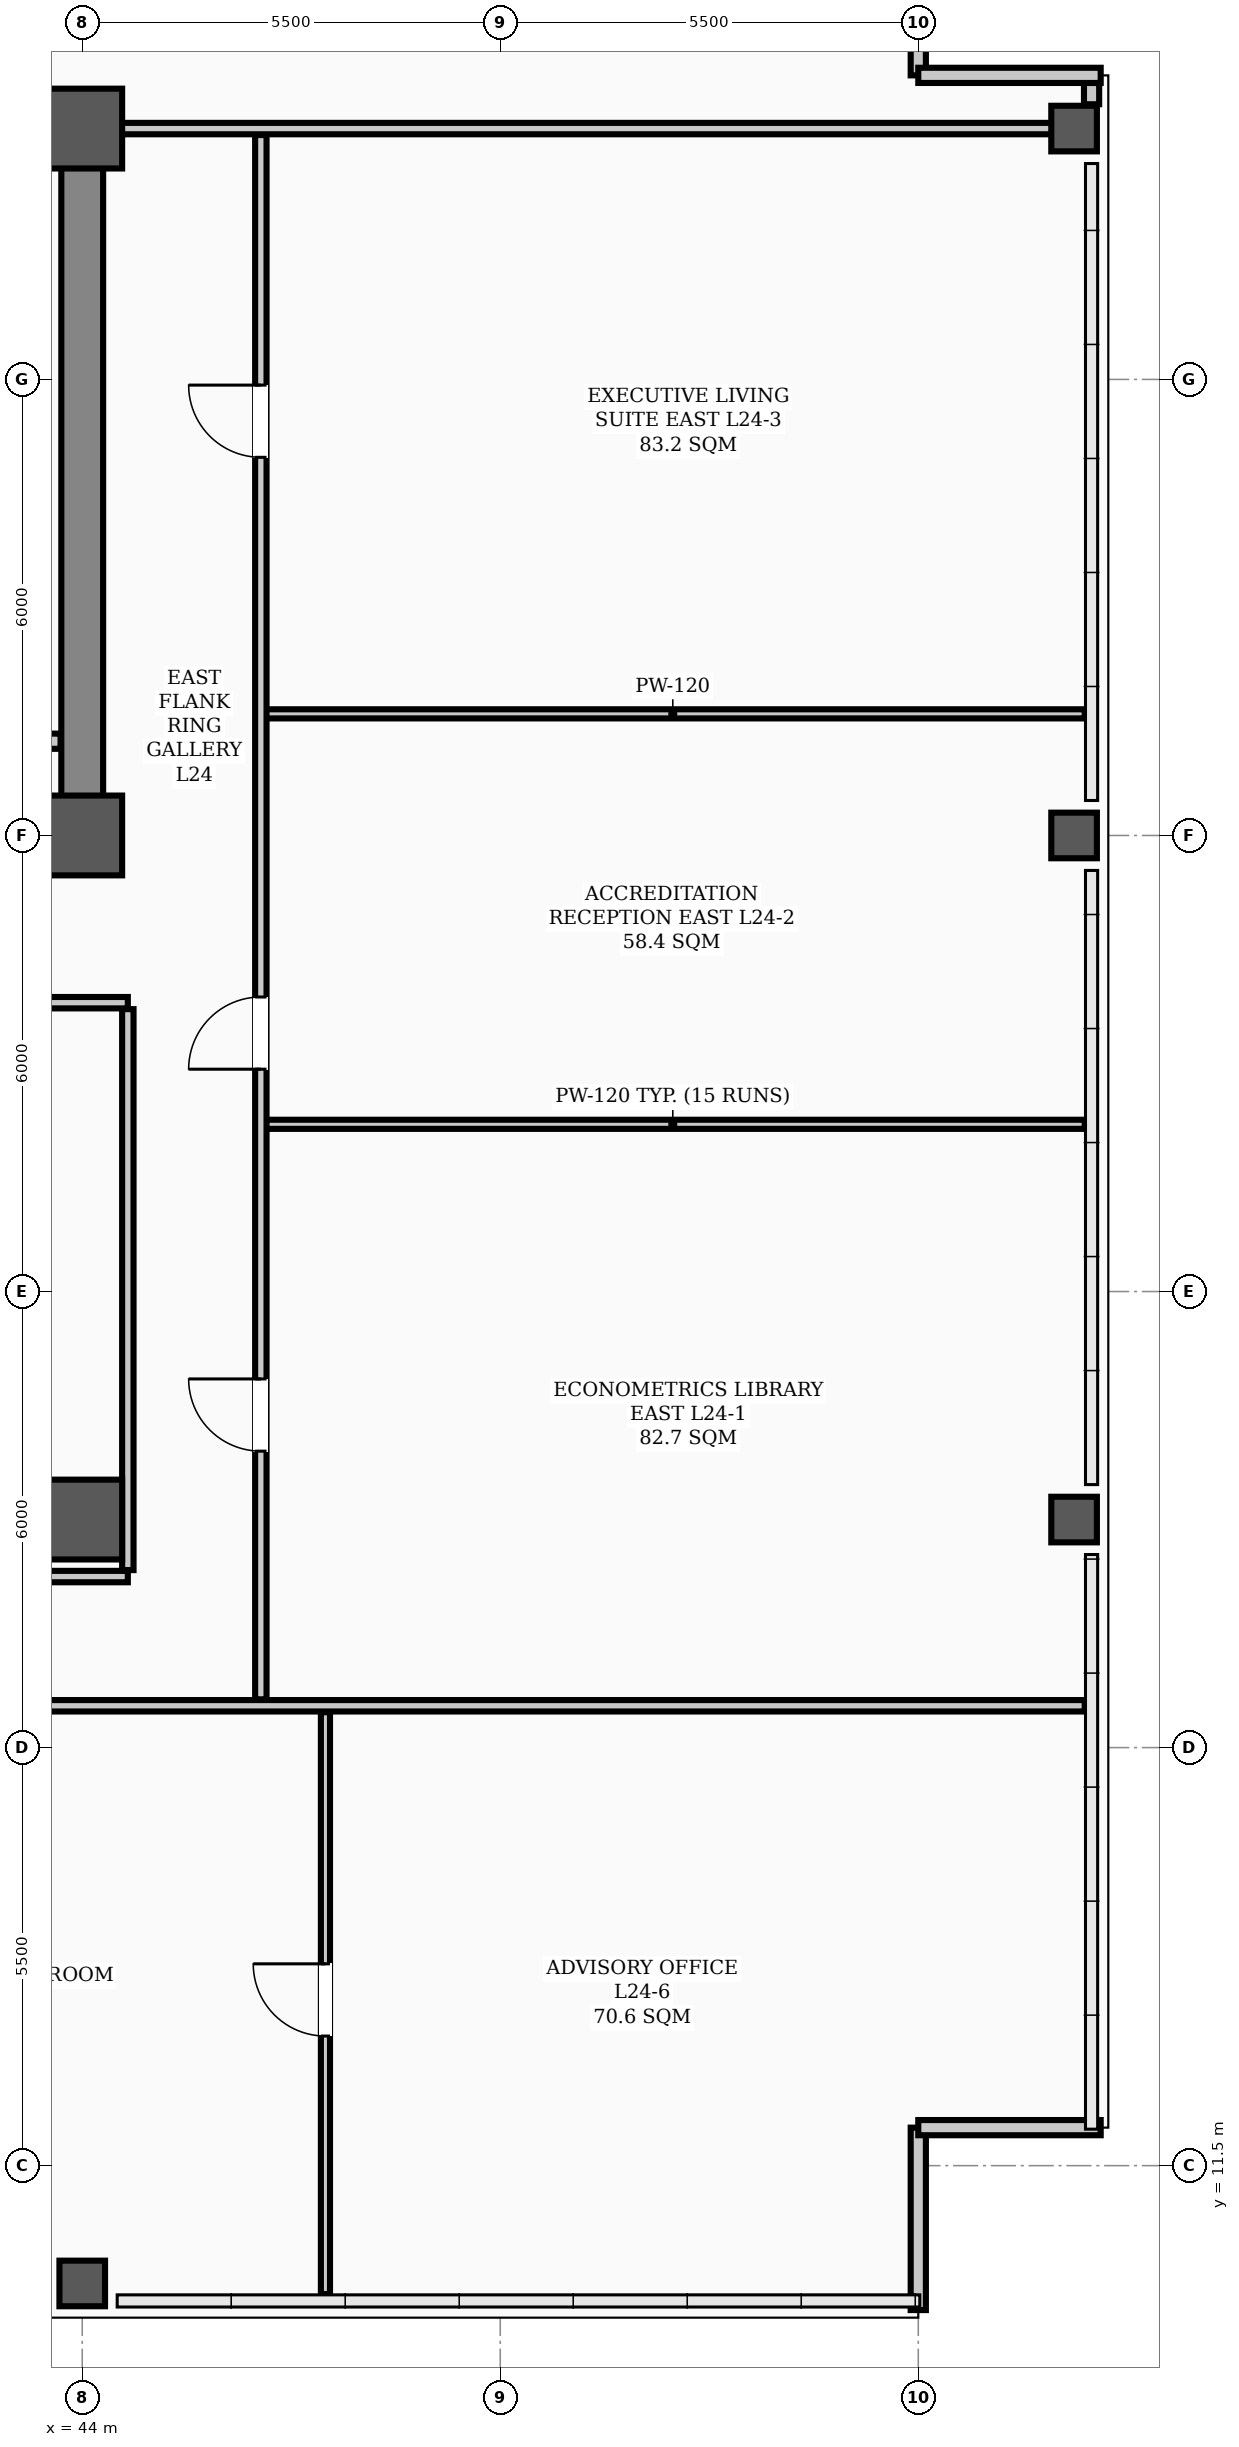
"""IFC4 building model, lengths in metres.
Left out: names, types, materials, properties, quantities, classifications, styles, units other than length and angle.
Written with IfcOpenShell. Run it as: python <this file> out.ifc"""

import sys

from ifc_helpers import new_model, si_unit, direction, frame, frame_2d, origin, origin_2d, place, context, subcontext, project, spatial, rectangle, hollow_rectangle, extrude, element, fill, save


model = new_model("IFC4")
c1 = context("Model", 3, precision=1e-05, world=origin(), true_north=direction((0.0, 1.0)))
c2 = subcontext(c1, "Body", "Model", "MODEL_VIEW")
j1 = project(units=[si_unit("LENGTHUNIT", "METRE"), si_unit("PLANEANGLEUNIT", "RADIAN")], contexts=[c1])
p1 = place(None, origin())
s1 = spatial("IfcSite", under=j1, at=p1, CompositionType="ELEMENT")
p2 = place(p1, origin())
s2 = spatial("IfcBuilding", under=s1, at=p2, CompositionType="ELEMENT")
p3 = place(p2, frame((0.0, 0.0, 96.7)))
s3 = spatial("IfcBuildingStorey", under=s2, at=p3, CompositionType="ELEMENT", Elevation=96.7)
for number, where, z_axis, x_axis in (
    (1, (44.0, 29.0, 0.0), (0.0, 0.0, 1.0), (1.0, 0.0, 0.0)),
    (2, (44.0, 38.3, 0.0), (0.0, 0.0, 1.0), (1.0, 0.0, 0.0)),
    (3, (44.0, 20.0, 0.0), (0.0, 0.0, 1.0), (1.0, 0.0, 0.0)),
):
    element("IfcColumn", number, at=place(p3, frame(where, z_axis=z_axis, x_axis=x_axis)), inside=s3, PredefinedType="COLUMN", context=c2, shape_type="SweptSolid", body=[
        extrude(hollow_rectangle(XDim=1.05, YDim=1.05, WallThickness=0.038, InnerFilletRadius=0.019, OuterFilletRadius=0.057, at=origin_2d()), origin(), (0.0, 0.0, 1.0), 3.9),
    ])
for number, where, z_axis, x_axis in (
    (4, (44.0, 9.95, 0.0), (0.0, 0.0, 1.0), (1.0, 0.0, 0.0)),
    (5, (57.05, 20.0, 0.0), (0.0, 0.0, 1.0), (1.0, 0.0, 0.0)),
    (6, (57.05, 29.0, 0.0), (0.0, 0.0, 1.0), (1.0, 0.0, 0.0)),
    (7, (57.05, 38.3, 0.0), (0.0, 0.0, 1.0), (1.0, 0.0, 0.0)),
):
    element("IfcColumn", number, at=place(p3, frame(where, z_axis=z_axis, x_axis=x_axis)), inside=s3, PredefinedType="COLUMN", context=c2, shape_type="SweptSolid", body=[
        extrude(hollow_rectangle(XDim=0.6, YDim=0.6, WallThickness=0.026, InnerFilletRadius=0.013, OuterFilletRadius=0.039, at=origin_2d()), origin(), (0.0, 0.0, 1.0), 3.9),
    ])
p4 = place(p3, frame((57.28, 38.62, 0.0), z_axis=(0.0, 0.0, 1.0), x_axis=(0.0, 1.0, 0.0)))
e8 = element("IfcWall", 8, at=p4, inside=s3, PredefinedType="PARAPET", context=c2, shape_type="SweptSolid", body=[
    extrude(rectangle(XDim=0.28, YDim=0.2, at=frame_2d((0.14, 0.0))), origin(), (0.0, 0.0, 1.0), 1.2),
])
for number, where, z_axis, x_axis in (
    (9, (55.0, 9.6, 0.0), (0.0, 0.0, 1.0), (0.0, 1.0, 0.0)),
    (10, (55.0, 12.0, 0.0), (0.0, 0.0, 1.0), (1.0, 0.0, 0.0)),
    (11, (55.0, 41.4, 0.0), (0.0, 0.0, 1.0), (0.0, -1.0, 0.0)),
    (12, (55.0, 39.0, 0.0), (0.0, 0.0, 1.0), (1.0, 0.0, 0.0)),
):
    element("IfcWall", number, at=place(p3, frame(where, z_axis=z_axis, x_axis=x_axis)), inside=s3, PredefinedType="PARAPET", context=c2, shape_type="SweptSolid", body=[
        extrude(rectangle(XDim=2.4, YDim=0.2, at=frame_2d((1.2, 0.0))), origin(), (0.0, 0.0, 1.0), 1.2),
    ])
p5 = place(p3, frame((13.5, 29.0, 0.0), z_axis=(0.0, 0.0, 1.0), x_axis=(1.0, 0.0, 0.0)))
e13 = element("IfcWall", 13, at=p5, inside=s3, PredefinedType="SHEAR", context=c2, shape_type="SweptSolid", body=[
    extrude(rectangle(XDim=30.5, YDim=0.55, at=frame_2d((15.25, 0.0))), origin(), (0.0, 0.0, 1.0), 3.6),
])
p6 = place(p5, frame((1.75, 0.0, 0.0)))
e14 = element("IfcOpeningElement", 14, at=p6, cuts=e13, PredefinedType="OPENING", context=c2, shape_type="SweptSolid", body=[
    extrude(rectangle(XDim=1.1, YDim=2.08, at=frame_2d((0.55, 1.04))), frame((0.0, 0.285, 0.0), z_axis=(0.0, -1.0, 0.0), x_axis=(1.0, 0.0, 0.0)), (0.0, 0.0, 1.0), 0.57),
])
p7 = place(p5, frame((26.7, 0.0, 0.0)))
e15 = element("IfcOpeningElement", 15, at=p7, cuts=e13, PredefinedType="OPENING", context=c2, shape_type="SweptSolid", body=[
    extrude(rectangle(XDim=1.1, YDim=2.08, at=frame_2d((0.55, 1.04))), frame((0.0, 0.285, 0.0), z_axis=(0.0, -1.0, 0.0), x_axis=(1.0, 0.0, 0.0)), (0.0, 0.0, 1.0), 0.57),
])
p8 = place(p5, frame((6.8, 0.0, 0.0)))
e16 = element("IfcOpeningElement", 16, at=p8, cuts=e13, PredefinedType="OPENING", context=c2, shape_type="SweptSolid", body=[
    extrude(rectangle(XDim=1.1, YDim=2.08, at=frame_2d((0.55, 1.04))), frame((0.0, 0.285, 0.0), z_axis=(0.0, -1.0, 0.0), x_axis=(1.0, 0.0, 0.0)), (0.0, 0.0, 1.0), 0.57),
])
p9 = place(p5, frame((13.2, 0.0, 0.0)))
e17 = element("IfcOpeningElement", 17, at=p9, cuts=e13, PredefinedType="OPENING", context=c2, shape_type="SweptSolid", body=[
    extrude(rectangle(XDim=1.6, YDim=2.08, at=frame_2d((0.8, 1.04))), frame((0.0, 0.285, 0.0), z_axis=(0.0, -1.0, 0.0), x_axis=(1.0, 0.0, 0.0)), (0.0, 0.0, 1.0), 0.57),
])
p10 = place(p5, frame((19.53, 0.0, 0.0)))
e18 = element("IfcOpeningElement", 18, at=p10, cuts=e13, PredefinedType="OPENING", context=c2, shape_type="SweptSolid", body=[
    extrude(rectangle(XDim=0.9, YDim=2.08, at=frame_2d((0.45, 1.04))), frame((0.0, 0.285, 0.0), z_axis=(0.0, -1.0, 0.0), x_axis=(1.0, 0.0, 0.0)), (0.0, 0.0, 1.0), 0.57),
])
p11 = place(p5, frame((21.57, 0.0, 0.0)))
e19 = element("IfcOpeningElement", 19, at=p11, cuts=e13, PredefinedType="OPENING", context=c2, shape_type="SweptSolid", body=[
    extrude(rectangle(XDim=0.9, YDim=2.08, at=frame_2d((0.45, 1.04))), frame((0.0, 0.285, 0.0), z_axis=(0.0, -1.0, 0.0), x_axis=(1.0, 0.0, 0.0)), (0.0, 0.0, 1.0), 0.57),
])
p12 = place(p3, frame((13.5, 38.3, 0.0), z_axis=(0.0, 0.0, 1.0), x_axis=(1.0, 0.0, 0.0)))
e20 = element("IfcWall", 20, at=p12, inside=s3, PredefinedType="SHEAR", context=c2, shape_type="SweptSolid", body=[
    extrude(rectangle(XDim=30.5, YDim=0.55, at=frame_2d((15.25, 0.0))), origin(), (0.0, 0.0, 1.0), 3.6),
])
p13 = place(p3, frame((44.0, 29.35, 0.0), z_axis=(0.0, 0.0, 1.0), x_axis=(0.0, 1.0, 0.0)))
e21 = element("IfcWall", 21, at=p13, inside=s3, PredefinedType="SHEAR", context=c2, shape_type="SweptSolid", body=[
    extrude(rectangle(XDim=8.6, YDim=0.55, at=frame_2d((4.3, 0.0))), origin(), (0.0, 0.0, 1.0), 3.6),
])
p14 = place(p3, frame((42.4, 30.24, 0.0), z_axis=(0.0, 0.0, 1.0), x_axis=(1.0, 0.0, 0.0)))
e22 = element("IfcWall", 22, at=p14, inside=s3, PredefinedType="STANDARD", context=c2, shape_type="SweptSolid", body=[
    extrude(rectangle(XDim=1.315, YDim=0.2, at=frame_2d((0.658, 0.0))), origin(), (0.0, 0.0, 1.0), 2.18),
])
p15 = place(p3, frame((12.9, 26.8, 0.0), z_axis=(0.0, 0.0, 1.0), x_axis=(1.0, 0.0, 0.0)))
e23 = element("IfcWall", 23, at=p15, inside=s3, PredefinedType="PARTITIONING", context=c2, shape_type="SweptSolid", body=[
    extrude(rectangle(XDim=31.7, YDim=0.15, at=frame_2d((15.85, 0.0))), origin(), (0.0, 0.0, 1.0), 2.18),
])
p16 = place(p15, frame((13.6, 0.0, 0.0)))
e24 = element("IfcOpeningElement", 24, at=p16, cuts=e23, PredefinedType="OPENING", context=c2, shape_type="SweptSolid", body=[
    extrude(rectangle(XDim=1.6, YDim=2.08, at=frame_2d((0.8, 1.04))), frame((0.0, 0.085, 0.0), z_axis=(0.0, -1.0, 0.0), x_axis=(1.0, 0.0, 0.0)), (0.0, 0.0, 1.0), 0.17),
])
p17 = place(p15, frame((2.075, 0.0, 0.0)))
e25 = element("IfcOpeningElement", 25, at=p17, cuts=e23, PredefinedType="OPENING", context=c2, shape_type="SweptSolid", body=[
    extrude(rectangle(XDim=0.95, YDim=2.08, at=frame_2d((0.475, 1.04))), frame((0.0, 0.085, 0.0), z_axis=(0.0, -1.0, 0.0), x_axis=(1.0, 0.0, 0.0)), (0.0, 0.0, 1.0), 0.17),
])
p18 = place(p15, frame((6.925, 0.0, 0.0)))
e26 = element("IfcOpeningElement", 26, at=p18, cuts=e23, PredefinedType="OPENING", context=c2, shape_type="SweptSolid", body=[
    extrude(rectangle(XDim=0.95, YDim=2.08, at=frame_2d((0.475, 1.04))), frame((0.0, 0.085, 0.0), z_axis=(0.0, -1.0, 0.0), x_axis=(1.0, 0.0, 0.0)), (0.0, 0.0, 1.0), 0.17),
])
p19 = place(p15, frame((11.025, 0.0, 0.0)))
e27 = element("IfcOpeningElement", 27, at=p19, cuts=e23, PredefinedType="OPENING", context=c2, shape_type="SweptSolid", body=[
    extrude(rectangle(XDim=0.95, YDim=2.08, at=frame_2d((0.475, 1.04))), frame((0.0, 0.085, 0.0), z_axis=(0.0, -1.0, 0.0), x_axis=(1.0, 0.0, 0.0)), (0.0, 0.0, 1.0), 0.17),
])
p20 = place(p15, frame((16.075, 0.0, 0.0)))
e28 = element("IfcOpeningElement", 28, at=p20, cuts=e23, PredefinedType="OPENING", context=c2, shape_type="SweptSolid", body=[
    extrude(rectangle(XDim=0.95, YDim=2.08, at=frame_2d((0.475, 1.04))), frame((0.0, 0.085, 0.0), z_axis=(0.0, -1.0, 0.0), x_axis=(1.0, 0.0, 0.0)), (0.0, 0.0, 1.0), 0.17),
])
p21 = place(p15, frame((22.025, 0.0, 0.0)))
e29 = element("IfcOpeningElement", 29, at=p21, cuts=e23, PredefinedType="OPENING", context=c2, shape_type="SweptSolid", body=[
    extrude(rectangle(XDim=0.95, YDim=2.08, at=frame_2d((0.475, 1.04))), frame((0.0, 0.085, 0.0), z_axis=(0.0, -1.0, 0.0), x_axis=(1.0, 0.0, 0.0)), (0.0, 0.0, 1.0), 0.17),
])
p22 = place(p15, frame((28.525, 0.0, 0.0)))
e30 = element("IfcOpeningElement", 30, at=p22, cuts=e23, PredefinedType="OPENING", context=c2, shape_type="SweptSolid", body=[
    extrude(rectangle(XDim=0.95, YDim=2.08, at=frame_2d((0.475, 1.04))), frame((0.0, 0.085, 0.0), z_axis=(0.0, -1.0, 0.0), x_axis=(1.0, 0.0, 0.0)), (0.0, 0.0, 1.0), 0.17),
])
p23 = place(p3, frame((7.81, 17.55, 0.0), z_axis=(0.0, 0.0, 1.0), x_axis=(1.0, 0.0, 0.0)))
e31 = element("IfcWall", 31, at=p23, inside=s3, PredefinedType="PARTITIONING", context=c2, shape_type="SweptSolid", body=[
    extrude(rectangle(XDim=49.38, YDim=0.15, at=frame_2d((24.69, 0.0))), origin(), (0.0, 0.0, 1.0), 2.18),
])
p24 = place(p23, frame((3.59, 0.0, 0.0)))
e32 = element("IfcOpeningElement", 32, at=p24, cuts=e31, PredefinedType="OPENING", context=c2, shape_type="SweptSolid", body=[
    extrude(rectangle(XDim=0.95, YDim=2.08, at=frame_2d((0.475, 1.04))), frame((0.0, 0.085, 0.0), z_axis=(0.0, -1.0, 0.0), x_axis=(1.0, 0.0, 0.0)), (0.0, 0.0, 1.0), 0.17),
])
p25 = place(p23, frame((10.115, 0.0, 0.0)))
e33 = element("IfcOpeningElement", 33, at=p25, cuts=e31, PredefinedType="OPENING", context=c2, shape_type="SweptSolid", body=[
    extrude(rectangle(XDim=0.95, YDim=2.08, at=frame_2d((0.475, 1.04))), frame((0.0, 0.085, 0.0), z_axis=(0.0, -1.0, 0.0), x_axis=(1.0, 0.0, 0.0)), (0.0, 0.0, 1.0), 0.17),
])
p26 = place(p23, frame((18.615, 0.0, 0.0)))
e34 = element("IfcOpeningElement", 34, at=p26, cuts=e31, PredefinedType="OPENING", context=c2, shape_type="SweptSolid", body=[
    extrude(rectangle(XDim=0.95, YDim=2.08, at=frame_2d((0.475, 1.04))), frame((0.0, 0.085, 0.0), z_axis=(0.0, -1.0, 0.0), x_axis=(1.0, 0.0, 0.0)), (0.0, 0.0, 1.0), 0.17),
])
p27 = place(p23, frame((27.315, 0.0, 0.0)))
e35 = element("IfcOpeningElement", 35, at=p27, cuts=e31, PredefinedType="OPENING", context=c2, shape_type="SweptSolid", body=[
    extrude(rectangle(XDim=0.95, YDim=2.08, at=frame_2d((0.475, 1.04))), frame((0.0, 0.085, 0.0), z_axis=(0.0, -1.0, 0.0), x_axis=(1.0, 0.0, 0.0)), (0.0, 0.0, 1.0), 0.17),
])
p28 = place(p23, frame((33.89, 0.0, 0.0)))
e36 = element("IfcOpeningElement", 36, at=p28, cuts=e31, PredefinedType="OPENING", context=c2, shape_type="SweptSolid", body=[
    extrude(rectangle(XDim=0.95, YDim=2.08, at=frame_2d((0.475, 1.04))), frame((0.0, 0.085, 0.0), z_axis=(0.0, -1.0, 0.0), x_axis=(1.0, 0.0, 0.0)), (0.0, 0.0, 1.0), 0.17),
])
p29 = place(p3, frame((28.4, 19.25, 0.0), z_axis=(0.0, 0.0, 1.0), x_axis=(1.0, 0.0, 0.0)))
e37 = element("IfcWall", 37, at=p29, inside=s3, PredefinedType="PARTITIONING", context=c2, shape_type="SweptSolid", body=[
    extrude(rectangle(XDim=16.2, YDim=0.15, at=frame_2d((8.1, 0.0))), origin(), (0.0, 0.0, 1.0), 2.18),
])
p30 = place(p3, frame((44.0, 38.3, 0.0), z_axis=(0.0, 0.0, 1.0), x_axis=(1.0, 0.0, 0.0)))
e38 = element("IfcWall", 38, at=p30, inside=s3, PredefinedType="PARTITIONING", context=c2, shape_type="SweptSolid", body=[
    extrude(rectangle(XDim=13.19, YDim=0.15, at=frame_2d((6.595, 0.0))), origin(), (0.0, 0.0, 1.0), 2.18),
])
for number, where, z_axis, x_axis in (
    (39, (46.35, 25.2, 0.0), (0.0, 0.0, 1.0), (1.0, 0.0, 0.0)),
    (40, (46.35, 30.6, 0.0), (0.0, 0.0, 1.0), (1.0, 0.0, 0.0)),
):
    element("IfcWall", number, at=place(p3, frame(where, z_axis=z_axis, x_axis=x_axis)), inside=s3, PredefinedType="PARTITIONING", context=c2, shape_type="SweptSolid", body=[
        extrude(rectangle(XDim=10.84, YDim=0.12, at=frame_2d((5.42, 0.0))), origin(), (0.0, 0.0, 1.0), 2.18),
    ])
p31 = place(p3, frame((46.35, 17.635, 0.0), z_axis=(0.0, 0.0, 1.0), x_axis=(0.0, 1.0, 0.0)))
e41 = element("IfcWall", 41, at=p31, inside=s3, PredefinedType="PARTITIONING", context=c2, shape_type="SweptSolid", body=[
    extrude(rectangle(XDim=20.58, YDim=0.15, at=frame_2d((10.29, 0.0))), origin(), (0.0, 0.0, 1.0), 2.18),
])
p32 = place(p31, frame((3.265, 0.0, 0.0)))
e42 = element("IfcOpeningElement", 42, at=p32, cuts=e41, PredefinedType="OPENING", context=c2, shape_type="SweptSolid", body=[
    extrude(rectangle(XDim=0.95, YDim=2.08, at=frame_2d((0.475, 1.04))), frame((0.0, 0.085, 0.0), z_axis=(0.0, -1.0, 0.0), x_axis=(1.0, 0.0, 0.0)), (0.0, 0.0, 1.0), 0.17),
])
p33 = place(p31, frame((8.29, 0.0, 0.0)))
e43 = element("IfcOpeningElement", 43, at=p33, cuts=e41, PredefinedType="OPENING", context=c2, shape_type="SweptSolid", body=[
    extrude(rectangle(XDim=0.95, YDim=2.08, at=frame_2d((0.475, 1.04))), frame((0.0, 0.085, 0.0), z_axis=(0.0, -1.0, 0.0), x_axis=(1.0, 0.0, 0.0)), (0.0, 0.0, 1.0), 0.17),
])
p34 = place(p31, frame((16.34, 0.0, 0.0)))
e44 = element("IfcOpeningElement", 44, at=p34, cuts=e41, PredefinedType="OPENING", context=c2, shape_type="SweptSolid", body=[
    extrude(rectangle(XDim=0.95, YDim=2.08, at=frame_2d((0.475, 1.04))), frame((0.0, 0.085, 0.0), z_axis=(0.0, -1.0, 0.0), x_axis=(1.0, 0.0, 0.0)), (0.0, 0.0, 1.0), 0.17),
])
p35 = place(p3, frame((44.6, 19.335, 0.0), z_axis=(0.0, 0.0, 1.0), x_axis=(0.0, 1.0, 0.0)))
e45 = element("IfcWall", 45, at=p35, inside=s3, PredefinedType="PARTITIONING", context=c2, shape_type="SweptSolid", body=[
    extrude(rectangle(XDim=7.38, YDim=0.15, at=frame_2d((3.69, 0.0))), origin(), (0.0, 0.0, 1.0), 2.18),
])
p36 = place(p3, frame((47.2, 9.81, 0.0), z_axis=(0.0, 0.0, 1.0), x_axis=(0.0, 1.0, 0.0)))
e46 = element("IfcWall", 46, at=p36, inside=s3, PredefinedType="PARTITIONING", context=c2, shape_type="SweptSolid", body=[
    extrude(rectangle(XDim=7.655, YDim=0.12, at=frame_2d((3.828, 0.0))), origin(), (0.0, 0.0, 1.0), 3.6),
])
p37 = place(p36, frame((3.395, 0.0, 0.0)))
e47 = element("IfcOpeningElement", 47, at=p37, cuts=e46, PredefinedType="OPENING", context=c2, shape_type="SweptSolid", body=[
    extrude(rectangle(XDim=0.95, YDim=2.08, at=frame_2d((0.475, 1.04))), frame((0.0, 0.07, 0.0), z_axis=(0.0, -1.0, 0.0), x_axis=(1.0, 0.0, 0.0)), (0.0, 0.0, 1.0), 0.14),
])
p38 = place(p37, origin())
e48 = element("IfcDoor", 48, at=p38, inside=s3, OperationType="SINGLE_SWING_RIGHT", PredefinedType="DOOR", context=c2, shape_type="SweptSolid", body=[
    extrude(rectangle(XDim=0.95, YDim=2.08, at=frame_2d((0.475, 1.04))), frame((0.0, 0.025, 0.0), z_axis=(0.0, -1.0, 0.0), x_axis=(1.0, 0.0, 0.0)), (0.0, 0.0, 1.0), 0.05),
])
fill(e47, e48)
p39 = place(p32, origin())
e49 = element("IfcDoor", 49, at=p39, inside=s3, OperationType="SINGLE_SWING_RIGHT", PredefinedType="DOOR", context=c2, shape_type="SweptSolid", body=[
    extrude(rectangle(XDim=0.95, YDim=2.08, at=frame_2d((0.475, 1.04))), frame((0.0, 0.025, 0.0), z_axis=(0.0, -1.0, 0.0), x_axis=(1.0, 0.0, 0.0)), (0.0, 0.0, 1.0), 0.05),
])
fill(e42, e49)
p40 = place(p33, origin())
e50 = element("IfcDoor", 50, at=p40, inside=s3, OperationType="SINGLE_SWING_LEFT", PredefinedType="DOOR", context=c2, shape_type="SweptSolid", body=[
    extrude(rectangle(XDim=0.95, YDim=2.08, at=frame_2d((0.475, 1.04))), frame((0.0, 0.025, 0.0), z_axis=(0.0, -1.0, 0.0), x_axis=(1.0, 0.0, 0.0)), (0.0, 0.0, 1.0), 0.05),
])
fill(e43, e50)
p41 = place(p34, origin())
e51 = element("IfcDoor", 51, at=p41, inside=s3, OperationType="SINGLE_SWING_RIGHT", PredefinedType="DOOR", context=c2, shape_type="SweptSolid", body=[
    extrude(rectangle(XDim=0.95, YDim=2.08, at=frame_2d((0.475, 1.04))), frame((0.0, 0.025, 0.0), z_axis=(0.0, -1.0, 0.0), x_axis=(1.0, 0.0, 0.0)), (0.0, 0.0, 1.0), 0.05),
])
fill(e44, e51)
save(model, sys.argv[1])
